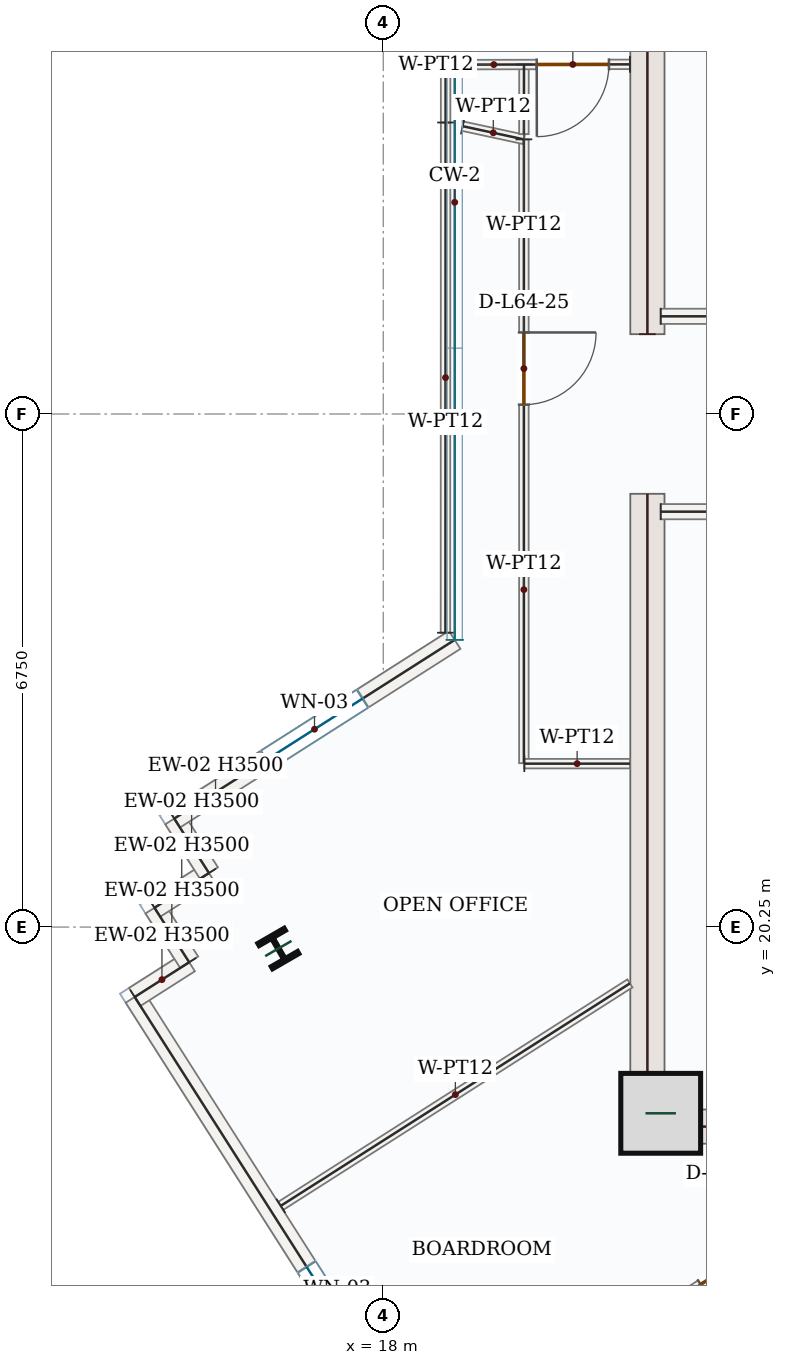
"""IFC4 building model, lengths in metres.
Left out: names, types, materials, properties, quantities, classifications, styles, units other than length and angle.
Written with IfcOpenShell. Run it as: python <this file> out.ifc"""

import sys

from ifc_helpers import new_model, si_unit, direction, frame, frame_2d, origin, origin_2d, place, context, subcontext, project, spatial, rectangle, i_section, extrude, source, transform, mapped, element, fill, save


model = new_model("IFC4")
c1 = context("Model", 3, precision=1e-05, world=origin(), true_north=direction((0.0, 1.0)))
c2 = subcontext(c1, "Body", "Model", "MODEL_VIEW")
j1 = project(units=[si_unit("LENGTHUNIT", "METRE"), si_unit("PLANEANGLEUNIT", "RADIAN")], contexts=[c1])
p1 = place(None, origin())
s1 = spatial("IfcSite", under=j1, at=p1, CompositionType="ELEMENT")
p2 = place(p1, origin())
s2 = spatial("IfcBuilding", under=s1, at=p2, CompositionType="ELEMENT")
p3 = place(p2, frame((0.0, 0.0, 269.1)))
s3 = spatial("IfcBuildingStorey", under=s2, at=p3, CompositionType="ELEMENT", Elevation=269.1)
m1 = source(origin(), c2, "Body", "SweptSolid", [
    extrude(rectangle(XDim=8.55, YDim=0.45, at=frame_2d((4.275, 0.0))), origin(), (0.0, 0.0, 1.0), 3.5),
])
for number, where, z_axis, x_axis in (
    (1, (21.475, 17.4, 0.0), (0.0, 0.0, 1.0), (0.0, 1.0, 0.0)),
    (2, (21.475, 28.05, 0.0), (0.0, 0.0, 1.0), (0.0, 1.0, 0.0)),
):
    element("IfcWall", number, at=place(p3, frame(where, z_axis=z_axis, x_axis=x_axis)), inside=s3, PredefinedType="SHEAR", context=c2, shape_type="MappedRepresentation", body=[
        mapped(m1, transform((0.0, 0.0, 0.0), x_axis=(1.0, 0.0, 0.0), y_axis=(0.0, 1.0, 0.0), z_axis=(0.0, 0.0, 1.0), scale=1.0)),
    ])
m2 = source(origin(), c2, "Body", "SweptSolid", [
    extrude(rectangle(XDim=7.1, YDim=0.45, at=frame_2d((3.55, 0.0))), origin(), (0.0, 0.0, 1.0), 3.5),
])
p4 = place(p3, frame((21.7, 17.625, 0.0), z_axis=(0.0, 0.0, 1.0), x_axis=(1.0, 0.0, 0.0)))
e3 = element("IfcWall", 3, at=p4, inside=s3, PredefinedType="SHEAR", context=c2, shape_type="MappedRepresentation", body=[
    mapped(m2, transform((0.0, 0.0, 0.0), x_axis=(1.0, 0.0, 0.0), y_axis=(0.0, 1.0, 0.0), z_axis=(0.0, 0.0, 1.0), scale=1.0)),
])
m3 = source(origin(), c2, "Body", "SweptSolid", [
    extrude(rectangle(XDim=1.05, YDim=1.05, at=origin_2d()), origin(), (0.0, 0.0, 1.0), 3.75),
])
p5 = place(p3, frame((21.65, 17.8, 0.0), z_axis=(0.0, 0.0, 1.0), x_axis=(1.0, 0.0, 0.0)))
e4 = element("IfcColumn", 4, at=p5, inside=s3, PredefinedType="COLUMN", context=c2, shape_type="MappedRepresentation", body=[
    mapped(m3, transform((0.0, 0.0, 0.0), x_axis=(1.0, 0.0, 0.0), y_axis=(0.0, 1.0, 0.0), z_axis=(0.0, 0.0, 1.0), scale=1.0)),
])
m4 = source(origin(), c2, "Body", "SweptSolid", [
    extrude(i_section(OverallWidth=0.399, OverallDepth=0.386, WebThickness=0.021, FlangeThickness=0.033, FilletRadius=0.018, at=origin_2d()), origin(), (0.0, 0.0, 1.0), 3.75),
])
p6 = place(p3, frame((16.62, 19.968, 0.0), z_axis=(0.0, 0.0, 1.0), x_axis=(0.866025403784, 0.5, 0.0)))
e5 = element("IfcColumn", 5, at=p6, inside=s3, PredefinedType="COLUMN", context=c2, shape_type="MappedRepresentation", body=[
    mapped(m4, transform((0.0, 0.0, 0.0), x_axis=(1.0, 0.0, 0.0), y_axis=(0.0, 1.0, 0.0), z_axis=(0.0, 0.0, 1.0), scale=1.0)),
])
p7 = place(p3, frame((20.06, 10.964, 0.0), z_axis=(0.0, 0.0, 1.0), x_axis=(-0.537314949054, 0.843381672508, 0.0)))
e6 = element("IfcWall", 6, at=p7, inside=s3, PredefinedType="SOLIDWALL", context=c2, shape_type="SweptSolid", body=[
    extrude(rectangle(XDim=9.92, YDim=0.28, at=frame_2d((4.96, 0.0))), origin(), (0.0, 0.0, 1.0), 3.5),
])
p8 = place(p7, frame((4.21, 0.0, 0.85)))
e7 = element("IfcOpeningElement", 7, at=p8, cuts=e6, PredefinedType="OPENING", context=c2, shape_type="SweptSolid", body=[
    extrude(rectangle(XDim=1.5, YDim=1.5, at=frame_2d((0.75, 0.75))), frame((0.0, 0.15, 0.0), z_axis=(0.0, -1.0, 0.0), x_axis=(1.0, 0.0, 0.0)), (0.0, 0.0, 1.0), 0.3),
])
m5 = source(origin(), c2, "Body", "SweptSolid", [
    extrude(rectangle(XDim=0.85, YDim=0.28, at=frame_2d((0.425, 0.0))), origin(), (0.0, 0.0, 1.0), 3.5),
])
p9 = place(p3, frame((14.73, 19.33, 0.0), z_axis=(0.0, 0.0, 1.0), x_axis=(0.843401251716, 0.537284215853, 0.0)))
e8 = element("IfcWall", 8, at=p9, inside=s3, PredefinedType="SOLIDWALL", context=c2, shape_type="MappedRepresentation", body=[
    mapped(m5, transform((0.0, 0.0, 0.0), x_axis=(1.0, 0.0, 0.0), y_axis=(0.0, 1.0, 0.0), z_axis=(0.0, 0.0, 1.0), scale=1.0)),
])
m6 = source(origin(), c2, "Body", "SweptSolid", [
    extrude(rectangle(XDim=0.85, YDim=0.28, at=frame_2d((0.425, 0.0))), origin(), (0.0, 0.0, 1.0), 3.5),
])
for number, where, z_axis, x_axis in (
    (9, (15.447, 19.787, 0.0), (0.0, 0.0, 1.0), (-0.537, 0.843, 0.0)),
    (10, (14.99, 20.504, 0.0), (0.0, 0.0, 1.0), (0.843, 0.537, 0.0)),
    (11, (15.707, 20.961, 0.0), (0.0, 0.0, 1.0), (-0.537, 0.843, 0.0)),
):
    element("IfcWall", number, at=place(p3, frame(where, z_axis=z_axis, x_axis=x_axis)), inside=s3, PredefinedType="SOLIDWALL", context=c2, shape_type="MappedRepresentation", body=[
        mapped(m6, transform((0.0, 0.0, 0.0), x_axis=(1.0, 0.0, 0.0), y_axis=(0.0, 1.0, 0.0), z_axis=(0.0, 0.0, 1.0), scale=1.0)),
    ])
p10 = place(p3, frame((15.25, 21.677, 0.0), z_axis=(0.0, 0.0, 1.0), x_axis=(0.843383352012, 0.537312312857, 0.0)))
e12 = element("IfcWall", 12, at=p10, inside=s3, PredefinedType="SOLIDWALL", context=c2, shape_type="SweptSolid", body=[
    extrude(rectangle(XDim=4.375, YDim=0.28, at=frame_2d((2.188, 0.0))), origin(), (0.0, 0.0, 1.0), 3.5),
])
p11 = place(p10, frame((1.438, 0.0, 0.85)))
e13 = element("IfcOpeningElement", 13, at=p11, cuts=e12, PredefinedType="OPENING", context=c2, shape_type="SweptSolid", body=[
    extrude(rectangle(XDim=1.5, YDim=1.5, at=frame_2d((0.75, 0.75))), frame((0.0, 0.15, 0.0), z_axis=(0.0, -1.0, 0.0), x_axis=(1.0, 0.0, 0.0)), (0.0, 0.0, 1.0), 0.3),
])
m7 = source(origin(), c2, "Body", "SweptSolid", [
    extrude(rectangle(XDim=4.25, YDim=0.2, at=frame_2d((2.125, 0.0))), origin(), (0.0, 0.0, 1.0), 3.5),
])
for number, where, z_axis, x_axis in (
    (14, (21.65, 25.715, 0.0), (0.0, 0.0, 1.0), (1.0, 0.0, 0.0)),
    (15, (21.65, 28.285, 0.0), (0.0, 0.0, 1.0), (1.0, 0.0, 0.0)),
):
    element("IfcWall", number, at=place(p3, frame(where, z_axis=z_axis, x_axis=x_axis)), inside=s3, PredefinedType="SOLIDWALL", context=c2, shape_type="MappedRepresentation", body=[
        mapped(m7, transform((0.0, 0.0, 0.0), x_axis=(1.0, 0.0, 0.0), y_axis=(0.0, 1.0, 0.0), z_axis=(0.0, 0.0, 1.0), scale=1.0)),
    ])
p12 = place(p3, frame((25.073, 17.395, 0.0), z_axis=(0.0, 0.0, 1.0), x_axis=(-0.843398332862, -0.537288797693, 0.0)))
e16 = element("IfcWall", 16, at=p12, inside=s3, PredefinedType="PARTITIONING", context=c2, shape_type="SweptSolid", body=[
    extrude(rectangle(XDim=5.924, YDim=0.125, at=frame_2d((2.962, 0.0))), origin(), (0.0, 0.0, 1.0), 3.5),
])
p13 = place(p12, frame((2.487, 0.0, 0.0)))
e17 = element("IfcOpeningElement", 17, at=p13, cuts=e16, PredefinedType="OPENING", context=c2, shape_type="SweptSolid", body=[
    extrude(rectangle(XDim=0.95, YDim=2.15, at=frame_2d((0.475, 1.075))), frame((0.0, 0.073, 0.0), z_axis=(0.0, -1.0, 0.0), x_axis=(1.0, 0.0, 0.0)), (0.0, 0.0, 1.0), 0.145),
])
m8 = source(origin(), c2, "Body", "SweptSolid", [
    extrude(rectangle(XDim=5.446, YDim=0.125, at=frame_2d((2.723, 0.0))), origin(), (0.0, 0.0, 1.0), 3.5),
])
p14 = place(p3, frame((16.652, 16.583, 0.0), z_axis=(0.0, 0.0, 1.0), x_axis=(0.843395566027, 0.537293140851, 0.0)))
e18 = element("IfcWall", 18, at=p14, inside=s3, PredefinedType="PARTITIONING", context=c2, shape_type="MappedRepresentation", body=[
    mapped(m8, transform((0.0, 0.0, 0.0), x_axis=(1.0, 0.0, 0.0), y_axis=(0.0, 1.0, 0.0), z_axis=(0.0, 0.0, 1.0), scale=1.0)),
])
p15 = place(p3, frame((19.85, 30.613, 0.0), z_axis=(0.0, 0.0, 1.0), x_axis=(0.0, -1.0, 0.0)))
e19 = element("IfcWall", 19, at=p15, inside=s3, PredefinedType="PARTITIONING", context=c2, shape_type="SweptSolid", body=[
    extrude(rectangle(XDim=8.207, YDim=0.125, at=frame_2d((4.104, 0.0))), origin(), (0.0, 0.0, 1.0), 3.5),
])
p16 = place(p15, frame((2.54, 0.0, 0.0)))
e20 = element("IfcOpeningElement", 20, at=p16, cuts=e19, PredefinedType="OPENING", context=c2, shape_type="SweptSolid", body=[
    extrude(rectangle(XDim=0.95, YDim=2.15, at=frame_2d((0.475, 1.075))), frame((0.0, 0.073, 0.0), z_axis=(0.0, -1.0, 0.0), x_axis=(1.0, 0.0, 0.0)), (0.0, 0.0, 1.0), 0.145),
])
m9 = source(origin(), c2, "Body", "SweptSolid", [
    extrude(rectangle(XDim=1.389, YDim=0.125, at=frame_2d((0.695, 0.0))), origin(), (0.0, 0.0, 1.0), 3.5),
])
p17 = place(p3, frame((19.856, 22.4, 0.0), z_axis=(0.0, 0.0, 1.0), x_axis=(1.0, 0.0, 0.0)))
e21 = element("IfcWall", 21, at=p17, inside=s3, PredefinedType="PARTITIONING", context=c2, shape_type="MappedRepresentation", body=[
    mapped(m9, transform((0.0, 0.0, 0.0), x_axis=(1.0, 0.0, 0.0), y_axis=(0.0, 1.0, 0.0), z_axis=(0.0, 0.0, 1.0), scale=1.0)),
])
m10 = source(origin(), c2, "Body", "SweptSolid", [
    extrude(rectangle(XDim=6.713, YDim=0.125, at=frame_2d((3.356, 0.0))), origin(), (0.0, 0.0, 1.0), 3.5),
])
p18 = place(p3, frame((18.818, 24.122, 0.0), z_axis=(0.0, 0.0, 1.0), x_axis=(0.000327332225, 0.999999946427, 0.0)))
e22 = element("IfcWall", 22, at=p18, inside=s3, PredefinedType="PARTITIONING", context=c2, shape_type="MappedRepresentation", body=[
    mapped(m10, transform((0.0, 0.0, 0.0), x_axis=(1.0, 0.0, 0.0), y_axis=(0.0, 1.0, 0.0), z_axis=(0.0, 0.0, 1.0), scale=1.0)),
])
m11 = source(origin(), c2, "Body", "SweptSolid", [
    extrude(rectangle(XDim=0.824, YDim=0.125, at=frame_2d((0.412, 0.0))), origin(), (0.0, 0.0, 1.0), 3.5),
])
p19 = place(p3, frame((19.045, 30.786, 0.0), z_axis=(0.0, 0.0, 1.0), x_axis=(0.977541402347, -0.210743461816, 0.0)))
e23 = element("IfcWall", 23, at=p19, inside=s3, PredefinedType="PARTITIONING", context=c2, shape_type="MappedRepresentation", body=[
    mapped(m11, transform((0.0, 0.0, 0.0), x_axis=(1.0, 0.0, 0.0), y_axis=(0.0, 1.0, 0.0), z_axis=(0.0, 0.0, 1.0), scale=1.0)),
])
m12 = source(origin(), c2, "Body", "SweptSolid", [
    extrude(rectangle(XDim=0.916, YDim=0.125, at=frame_2d((0.458, 0.0))), origin(), (0.0, 0.0, 1.0), 3.5),
])
p20 = place(p3, frame((19.851, 31.598, 0.0), z_axis=(0.0, 0.0, 1.0), x_axis=(-0.001332976688, -0.999999111586, 0.0)))
e24 = element("IfcWall", 24, at=p20, inside=s3, PredefinedType="PARTITIONING", context=c2, shape_type="MappedRepresentation", body=[
    mapped(m12, transform((0.0, 0.0, 0.0), x_axis=(1.0, 0.0, 0.0), y_axis=(0.0, 1.0, 0.0), z_axis=(0.0, 0.0, 1.0), scale=1.0)),
])
m13 = source(origin(), c2, "Body", "SweptSolid", [
    extrude(rectangle(XDim=4.757, YDim=0.125, at=frame_2d((2.378, 0.0))), origin(), (0.0, 0.0, 1.0), 3.5),
])
p21 = place(p3, frame((18.82, 30.835, 0.0), z_axis=(0.0, 0.0, 1.0), x_axis=(0.0, 1.0, 0.0)))
e25 = element("IfcWall", 25, at=p21, inside=s3, PredefinedType="PARTITIONING", context=c2, shape_type="MappedRepresentation", body=[
    mapped(m13, transform((0.0, 0.0, 0.0), x_axis=(1.0, 0.0, 0.0), y_axis=(0.0, 1.0, 0.0), z_axis=(0.0, 0.0, 1.0), scale=1.0)),
])
p22 = place(p3, frame((21.245, 31.6, 0.0), z_axis=(0.0, 0.0, 1.0), x_axis=(-0.999998798684, -0.001550042425, 0.0)))
e26 = element("IfcWall", 26, at=p22, inside=s3, PredefinedType="PARTITIONING", context=c2, shape_type="SweptSolid", body=[
    extrude(rectangle(XDim=2.205, YDim=0.125, at=frame_2d((1.103, 0.0))), origin(), (0.0, 0.0, 1.0), 3.5),
])
p23 = place(p22, frame((0.276, 0.0, 0.0)))
e27 = element("IfcOpeningElement", 27, at=p23, cuts=e26, PredefinedType="OPENING", context=c2, shape_type="SweptSolid", body=[
    extrude(rectangle(XDim=0.95, YDim=2.15, at=frame_2d((0.475, 1.075))), frame((0.0, 0.073, 0.0), z_axis=(0.0, -1.0, 0.0), x_axis=(1.0, 0.0, 0.0)), (0.0, 0.0, 1.0), 0.145),
])
m14 = source(origin(), c2, "Body", "SweptSolid", [
    extrude(rectangle(XDim=1.5, YDim=1.5, at=frame_2d((0.75, 0.75))), frame((0.0, 0.03, 0.0), z_axis=(0.0, -1.0, 0.0), x_axis=(1.0, 0.0, 0.0)), (0.0, 0.0, 1.0), 0.06),
])
p24 = place(p8, origin())
e28 = element("IfcWindow", 28, at=p24, inside=s3, PartitioningType="SINGLE_PANEL", PredefinedType="WINDOW", context=c2, shape_type="MappedRepresentation", body=[
    mapped(m14, transform((0.0, 0.0, 0.0), x_axis=(1.0, 0.0, 0.0), y_axis=(0.0, 1.0, 0.0), z_axis=(0.0, 0.0, 1.0), scale=1.0)),
])
fill(e7, e28)
p25 = place(p11, origin())
e29 = element("IfcWindow", 29, at=p25, inside=s3, PartitioningType="SINGLE_PANEL", PredefinedType="WINDOW", context=c2, shape_type="MappedRepresentation", body=[
    mapped(m14, transform((0.0, 0.0, 0.0), x_axis=(1.0, 0.0, 0.0), y_axis=(0.0, 1.0, 0.0), z_axis=(0.0, 0.0, 1.0), scale=1.0)),
])
fill(e13, e29)
m15 = source(origin(), c2, "Body", "SweptSolid", [
    extrude(rectangle(XDim=0.95, YDim=2.15, at=frame_2d((0.475, 1.075))), frame((0.0, 0.025, 0.0), z_axis=(0.0, -1.0, 0.0), x_axis=(1.0, 0.0, 0.0)), (0.0, 0.0, 1.0), 0.05),
])
p26 = place(p23, origin())
e30 = element("IfcDoor", 30, at=p26, inside=s3, OperationType="SINGLE_SWING_RIGHT", PredefinedType="DOOR", context=c2, shape_type="MappedRepresentation", body=[
    mapped(m15, transform((0.0, 0.0, 0.0), x_axis=(1.0, 0.0, 0.0), y_axis=(0.0, 1.0, 0.0), z_axis=(0.0, 0.0, 1.0), scale=1.0)),
])
fill(e27, e30)
p27 = place(p16, origin())
e31 = element("IfcDoor", 31, at=p27, inside=s3, OperationType="SINGLE_SWING_LEFT", PredefinedType="DOOR", context=c2, shape_type="MappedRepresentation", body=[
    mapped(m15, transform((0.0, 0.0, 0.0), x_axis=(1.0, 0.0, 0.0), y_axis=(0.0, 1.0, 0.0), z_axis=(0.0, 0.0, 1.0), scale=1.0)),
])
fill(e20, e31)
p28 = place(p13, origin())
e32 = element("IfcDoor", 32, at=p28, inside=s3, OperationType="SINGLE_SWING_RIGHT", PredefinedType="DOOR", context=c2, shape_type="MappedRepresentation", body=[
    mapped(m15, transform((0.0, 0.0, 0.0), x_axis=(1.0, 0.0, 0.0), y_axis=(0.0, 1.0, 0.0), z_axis=(0.0, 0.0, 1.0), scale=1.0)),
])
fill(e17, e32)
save(model, sys.argv[1])
